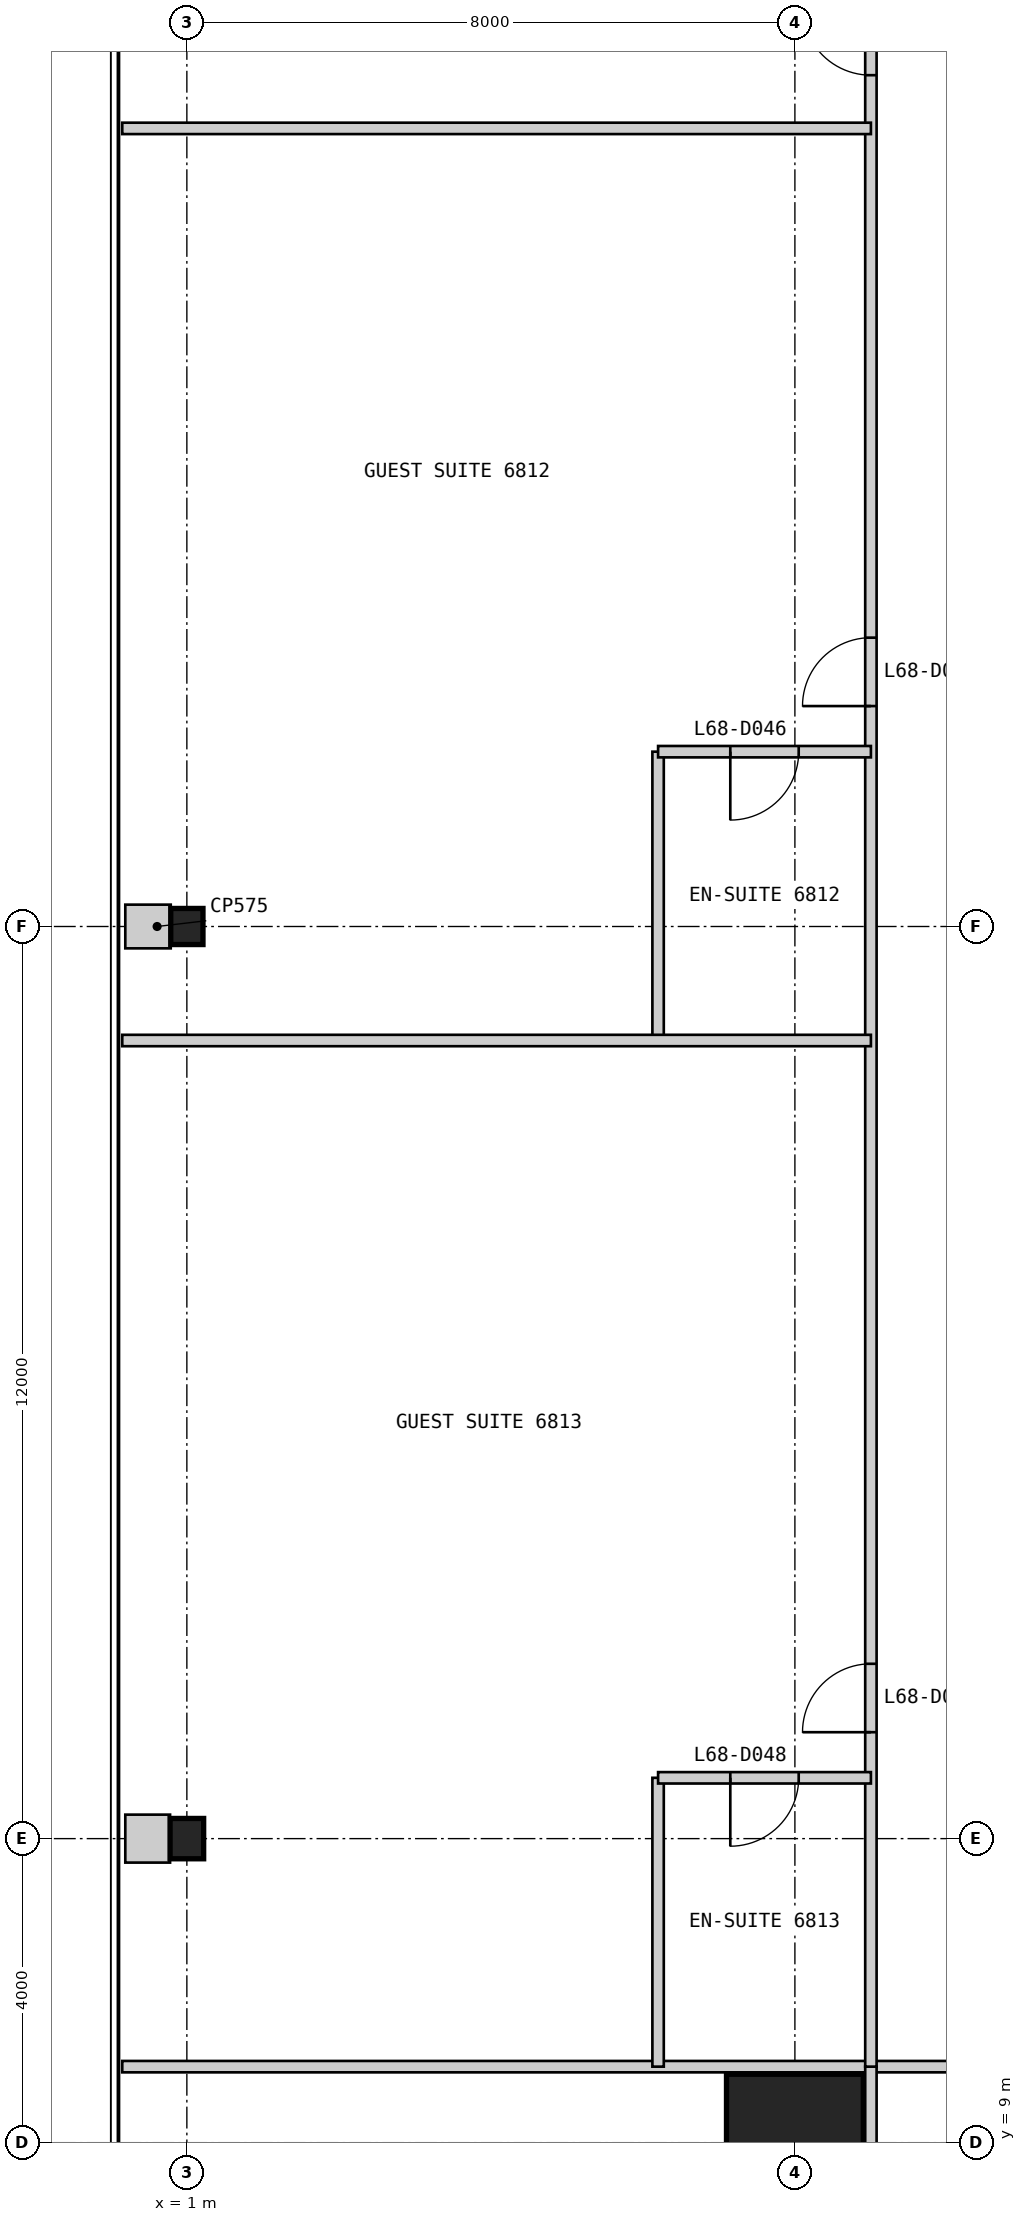
"""IFC4 building model, lengths in metres.
Left out: names, types, materials, properties, quantities, classifications, styles, units other than length and angle.
Written with IfcOpenShell. Run it as: python <this file> out.ifc"""

import sys

from ifc_helpers import new_model, si_unit, direction, frame, frame_2d, origin, origin_2d, place, context, subcontext, project, spatial, rectangle, i_section, extrude, element, fill, save


model = new_model("IFC4")
c1 = context("Model", 3, precision=1e-05, world=origin(), true_north=direction((0.0, 1.0)))
c2 = subcontext(c1, "Body", "Model", "MODEL_VIEW")
j1 = project(units=[si_unit("LENGTHUNIT", "METRE"), si_unit("PLANEANGLEUNIT", "RADIAN")], contexts=[c1])
p1 = place(None, origin())
s1 = spatial("IfcSite", under=j1, at=p1, CompositionType="ELEMENT")
p2 = place(p1, origin())
s2 = spatial("IfcBuilding", under=s1, at=p2, CompositionType="ELEMENT")
p3 = place(p2, frame((0.0, 0.0, 283.2)))
s3 = spatial("IfcBuildingStorey", under=s2, at=p3, CompositionType="ELEMENT", Elevation=283.2)
p4 = place(p3, frame((9.0, 9.0, 0.0), z_axis=(0.0, 0.0, 1.0), x_axis=(1.0, 0.0, 0.0)))
e1 = element("IfcColumn", 1, at=p4, inside=s3, PredefinedType="COLUMN", context=c2, shape_type="SweptSolid", body=[
    extrude(rectangle(XDim=1.8, YDim=1.8, at=origin_2d()), origin(), (0.0, 0.0, 1.0), 3.4),
])
p5 = place(p3, frame((1.0, 25.0, 0.0), z_axis=(0.0, 0.0, 1.0), x_axis=(1.0, 0.0, 0.0)))
e2 = element("IfcColumn", 2, at=p5, inside=s3, PredefinedType="COLUMN", context=c2, shape_type="SweptSolid", body=[
    extrude(i_section(OverallWidth=0.424, OverallDepth=0.475, WebThickness=0.048, FlangeThickness=0.077, at=origin_2d()), origin(), (0.0, 0.0, 1.0), 3.4),
])
p6 = place(p3, frame((1.0, 13.0, 0.0), z_axis=(0.0, 0.0, 1.0), x_axis=(1.0, 0.0, 0.0)))
e3 = element("IfcColumn", 3, at=p6, inside=s3, PredefinedType="COLUMN", context=c2, shape_type="SweptSolid", body=[
    extrude(i_section(OverallWidth=0.442, OverallDepth=0.531, WebThickness=0.066, FlangeThickness=0.106, at=origin_2d()), origin(), (0.0, 0.0, 1.0), 3.4),
])
p7 = place(p3, frame((10.0, 10.0, 0.0), z_axis=(0.0, 0.0, 1.0), x_axis=(1.0, 0.0, 0.0)))
e4 = element("IfcWall", 4, at=p7, inside=s3, PredefinedType="PARTITIONING", context=c2, shape_type="SweptSolid", body=[
    extrude(rectangle(XDim=30.0, YDim=0.15, at=frame_2d((15.0, 0.0))), origin(), (0.0, 0.0, 1.0), 3.25),
])
p8 = place(p7, frame((2.9, 0.0, 0.0)))
e5 = element("IfcOpeningElement", 5, at=p8, cuts=e4, PredefinedType="OPENING", context=c2, shape_type="SweptSolid", body=[
    extrude(rectangle(XDim=0.9, YDim=2.1, at=frame_2d((0.45, 1.05))), frame((0.0, 0.085, 0.0), z_axis=(0.0, -1.0, 0.0), x_axis=(1.0, 0.0, 0.0)), (0.0, 0.0, 1.0), 0.17),
])
p9 = place(p7, frame((11.2, 0.0, 0.0)))
e6 = element("IfcOpeningElement", 6, at=p9, cuts=e4, PredefinedType="OPENING", context=c2, shape_type="SweptSolid", body=[
    extrude(rectangle(XDim=0.9, YDim=2.1, at=frame_2d((0.45, 1.05))), frame((0.0, 0.085, 0.0), z_axis=(0.0, -1.0, 0.0), x_axis=(1.0, 0.0, 0.0)), (0.0, 0.0, 1.0), 0.17),
])
p10 = place(p7, frame((17.6, 0.0, 0.0)))
e7 = element("IfcOpeningElement", 7, at=p10, cuts=e4, PredefinedType="OPENING", context=c2, shape_type="SweptSolid", body=[
    extrude(rectangle(XDim=0.9, YDim=2.1, at=frame_2d((0.45, 1.05))), frame((0.0, 0.085, 0.0), z_axis=(0.0, -1.0, 0.0), x_axis=(1.0, 0.0, 0.0)), (0.0, 0.0, 1.0), 0.17),
])
p11 = place(p7, frame((26.3, 0.0, 0.0)))
e8 = element("IfcOpeningElement", 8, at=p11, cuts=e4, PredefinedType="OPENING", context=c2, shape_type="SweptSolid", body=[
    extrude(rectangle(XDim=1.0, YDim=2.1, at=frame_2d((0.5, 1.05))), frame((0.0, 0.085, 0.0), z_axis=(0.0, -1.0, 0.0), x_axis=(1.0, 0.0, 0.0)), (0.0, 0.0, 1.0), 0.17),
])
p12 = place(p3, frame((0.15, 10.0, 0.0), z_axis=(0.0, 0.0, 1.0), x_axis=(1.0, 0.0, 0.0)))
e9 = element("IfcWall", 9, at=p12, inside=s3, PredefinedType="PARTITIONING", context=c2, shape_type="SweptSolid", body=[
    extrude(rectangle(XDim=9.85, YDim=0.15, at=frame_2d((4.925, 0.0))), origin(), (0.0, 0.0, 1.0), 3.25),
])
p13 = place(p3, frame((10.0, 7.4, 0.0), z_axis=(0.0, 0.0, 1.0), x_axis=(0.0, 1.0, 0.0)))
e10 = element("IfcWall", 10, at=p13, inside=s3, PredefinedType="PARTITIONING", context=c2, shape_type="SweptSolid", body=[
    extrude(rectangle(XDim=2.6, YDim=0.15, at=frame_2d((1.3, 0.0))), origin(), (0.0, 0.0, 1.0), 3.25),
])
p14 = place(p3, frame((10.0, 40.0, 0.0), z_axis=(0.0, 0.0, 1.0), x_axis=(0.0, -1.0, 0.0)))
e11 = element("IfcWall", 11, at=p14, inside=s3, PredefinedType="PARTITIONING", context=c2, shape_type="SweptSolid", body=[
    extrude(rectangle(XDim=30.0, YDim=0.15, at=frame_2d((15.0, 0.0))), origin(), (0.0, 0.0, 1.0), 2.638),
])
p15 = place(p14, frame((2.9, 0.0, 0.0)))
e12 = element("IfcOpeningElement", 12, at=p15, cuts=e11, PredefinedType="OPENING", context=c2, shape_type="SweptSolid", body=[
    extrude(rectangle(XDim=0.9, YDim=2.1, at=frame_2d((0.45, 1.05))), frame((0.0, 0.085, 0.0), z_axis=(0.0, -1.0, 0.0), x_axis=(1.0, 0.0, 0.0)), (0.0, 0.0, 1.0), 0.17),
])
p16 = place(p14, frame((11.2, 0.0, 0.0)))
e13 = element("IfcOpeningElement", 13, at=p16, cuts=e11, PredefinedType="OPENING", context=c2, shape_type="SweptSolid", body=[
    extrude(rectangle(XDim=0.9, YDim=2.1, at=frame_2d((0.45, 1.05))), frame((0.0, 0.085, 0.0), z_axis=(0.0, -1.0, 0.0), x_axis=(1.0, 0.0, 0.0)), (0.0, 0.0, 1.0), 0.17),
])
p17 = place(p14, frame((24.7, 0.0, 0.0)))
e14 = element("IfcOpeningElement", 14, at=p17, cuts=e11, PredefinedType="OPENING", context=c2, shape_type="SweptSolid", body=[
    extrude(rectangle(XDim=0.9, YDim=2.1, at=frame_2d((0.45, 1.05))), frame((0.0, 0.085, 0.0), z_axis=(0.0, -1.0, 0.0), x_axis=(1.0, 0.0, 0.0)), (0.0, 0.0, 1.0), 0.17),
])
p18 = place(p3, frame((0.15, 35.5, 0.0), z_axis=(0.0, 0.0, 1.0), x_axis=(1.0, 0.0, 0.0)))
e15 = element("IfcWall", 15, at=p18, inside=s3, PredefinedType="PARTITIONING", context=c2, shape_type="SweptSolid", body=[
    extrude(rectangle(XDim=9.85, YDim=0.15, at=frame_2d((4.925, 0.0))), origin(), (0.0, 0.0, 1.0), 3.25),
])
p19 = place(p3, frame((7.2, 27.3, 0.0), z_axis=(0.0, 0.0, 1.0), x_axis=(0.0, -1.0, 0.0)))
e16 = element("IfcWall", 16, at=p19, inside=s3, PredefinedType="PARTITIONING", context=c2, shape_type="SweptSolid", body=[
    extrude(rectangle(XDim=3.8, YDim=0.15, at=frame_2d((1.9, 0.0))), origin(), (0.0, 0.0, 1.0), 3.25),
])
p20 = place(p3, frame((7.2, 27.3, 0.0), z_axis=(0.0, 0.0, 1.0), x_axis=(1.0, 0.0, 0.0)))
e17 = element("IfcWall", 17, at=p20, inside=s3, PredefinedType="PARTITIONING", context=c2, shape_type="SweptSolid", body=[
    extrude(rectangle(XDim=2.8, YDim=0.15, at=frame_2d((1.4, 0.0))), origin(), (0.0, 0.0, 1.0), 3.25),
])
p21 = place(p20, frame((0.95, 0.0, 0.0)))
e18 = element("IfcOpeningElement", 18, at=p21, cuts=e17, PredefinedType="OPENING", context=c2, shape_type="SweptSolid", body=[
    extrude(rectangle(XDim=0.9, YDim=2.1, at=frame_2d((0.45, 1.05))), frame((0.0, 0.085, 0.0), z_axis=(0.0, -1.0, 0.0), x_axis=(1.0, 0.0, 0.0)), (0.0, 0.0, 1.0), 0.17),
])
p22 = place(p3, frame((0.15, 23.5, 0.0), z_axis=(0.0, 0.0, 1.0), x_axis=(1.0, 0.0, 0.0)))
e19 = element("IfcWall", 19, at=p22, inside=s3, PredefinedType="PARTITIONING", context=c2, shape_type="SweptSolid", body=[
    extrude(rectangle(XDim=9.85, YDim=0.15, at=frame_2d((4.925, 0.0))), origin(), (0.0, 0.0, 1.0), 3.25),
])
p23 = place(p3, frame((7.2, 13.8, 0.0), z_axis=(0.0, 0.0, 1.0), x_axis=(0.0, -1.0, 0.0)))
e20 = element("IfcWall", 20, at=p23, inside=s3, PredefinedType="PARTITIONING", context=c2, shape_type="SweptSolid", body=[
    extrude(rectangle(XDim=3.8, YDim=0.15, at=frame_2d((1.9, 0.0))), origin(), (0.0, 0.0, 1.0), 3.25),
])
p24 = place(p3, frame((7.2, 13.8, 0.0), z_axis=(0.0, 0.0, 1.0), x_axis=(1.0, 0.0, 0.0)))
e21 = element("IfcWall", 21, at=p24, inside=s3, PredefinedType="PARTITIONING", context=c2, shape_type="SweptSolid", body=[
    extrude(rectangle(XDim=2.8, YDim=0.15, at=frame_2d((1.4, 0.0))), origin(), (0.0, 0.0, 1.0), 3.25),
])
p25 = place(p24, frame((0.95, 0.0, 0.0)))
e22 = element("IfcOpeningElement", 22, at=p25, cuts=e21, PredefinedType="OPENING", context=c2, shape_type="SweptSolid", body=[
    extrude(rectangle(XDim=0.9, YDim=2.1, at=frame_2d((0.45, 1.05))), frame((0.0, 0.085, 0.0), z_axis=(0.0, -1.0, 0.0), x_axis=(1.0, 0.0, 0.0)), (0.0, 0.0, 1.0), 0.17),
])
p26 = place(p3, frame((0.19, 25.0, 0.0), z_axis=(0.0, 0.0, 1.0), x_axis=(1.0, 0.0, 0.0)))
e23 = element("IfcWall", 23, at=p26, inside=s3, PredefinedType="PARTITIONING", context=c2, shape_type="SweptSolid", body=[
    extrude(rectangle(XDim=0.598, YDim=0.575, at=frame_2d((0.299, 0.0))), origin(), (0.0, 0.0, 1.0), 3.25),
])
p27 = place(p3, frame((0.19, 13.0, 0.0), z_axis=(0.0, 0.0, 1.0), x_axis=(1.0, 0.0, 0.0)))
e24 = element("IfcWall", 24, at=p27, inside=s3, PredefinedType="PARTITIONING", context=c2, shape_type="SweptSolid", body=[
    extrude(rectangle(XDim=0.589, YDim=0.631, at=frame_2d((0.294, 0.0))), origin(), (0.0, 0.0, 1.0), 3.25),
])
p28 = place(p15, frame((0.9, 0.0, 0.0), z_axis=(0.0, 0.0, 1.0), x_axis=(-1.0, 0.0, 0.0)))
e25 = element("IfcDoor", 25, at=p28, inside=s3, OperationType="SINGLE_SWING_RIGHT", PredefinedType="DOOR", context=c2, shape_type="SweptSolid", body=[
    extrude(rectangle(XDim=0.9, YDim=2.1, at=frame_2d((0.45, 1.05))), frame((0.0, 0.025, 0.0), z_axis=(0.0, -1.0, 0.0), x_axis=(1.0, 0.0, 0.0)), (0.0, 0.0, 1.0), 0.05),
])
fill(e12, e25)
p29 = place(p21, frame((0.9, 0.0, 0.0), z_axis=(0.0, 0.0, 1.0), x_axis=(-1.0, 0.0, 0.0)))
e26 = element("IfcDoor", 26, at=p29, inside=s3, OperationType="SINGLE_SWING_RIGHT", PredefinedType="DOOR", context=c2, shape_type="SweptSolid", body=[
    extrude(rectangle(XDim=0.9, YDim=2.1, at=frame_2d((0.45, 1.05))), frame((0.0, 0.025, 0.0), z_axis=(0.0, -1.0, 0.0), x_axis=(1.0, 0.0, 0.0)), (0.0, 0.0, 1.0), 0.05),
])
fill(e18, e26)
p30 = place(p16, frame((0.9, 0.0, 0.0), z_axis=(0.0, 0.0, 1.0), x_axis=(-1.0, 0.0, 0.0)))
e27 = element("IfcDoor", 27, at=p30, inside=s3, OperationType="SINGLE_SWING_LEFT", PredefinedType="DOOR", context=c2, shape_type="SweptSolid", body=[
    extrude(rectangle(XDim=0.9, YDim=2.1, at=frame_2d((0.45, 1.05))), frame((0.0, 0.025, 0.0), z_axis=(0.0, -1.0, 0.0), x_axis=(1.0, 0.0, 0.0)), (0.0, 0.0, 1.0), 0.05),
])
fill(e13, e27)
p31 = place(p25, frame((0.9, 0.0, 0.0), z_axis=(0.0, 0.0, 1.0), x_axis=(-1.0, 0.0, 0.0)))
e28 = element("IfcDoor", 28, at=p31, inside=s3, OperationType="SINGLE_SWING_RIGHT", PredefinedType="DOOR", context=c2, shape_type="SweptSolid", body=[
    extrude(rectangle(XDim=0.9, YDim=2.1, at=frame_2d((0.45, 1.05))), frame((0.0, 0.025, 0.0), z_axis=(0.0, -1.0, 0.0), x_axis=(1.0, 0.0, 0.0)), (0.0, 0.0, 1.0), 0.05),
])
fill(e22, e28)
p32 = place(p17, frame((0.9, 0.0, 0.0), z_axis=(0.0, 0.0, 1.0), x_axis=(-1.0, 0.0, 0.0)))
e29 = element("IfcDoor", 29, at=p32, inside=s3, OperationType="SINGLE_SWING_LEFT", PredefinedType="DOOR", context=c2, shape_type="SweptSolid", body=[
    extrude(rectangle(XDim=0.9, YDim=2.1, at=frame_2d((0.45, 1.05))), frame((0.0, 0.025, 0.0), z_axis=(0.0, -1.0, 0.0), x_axis=(1.0, 0.0, 0.0)), (0.0, 0.0, 1.0), 0.05),
])
fill(e14, e29)
save(model, sys.argv[1])
